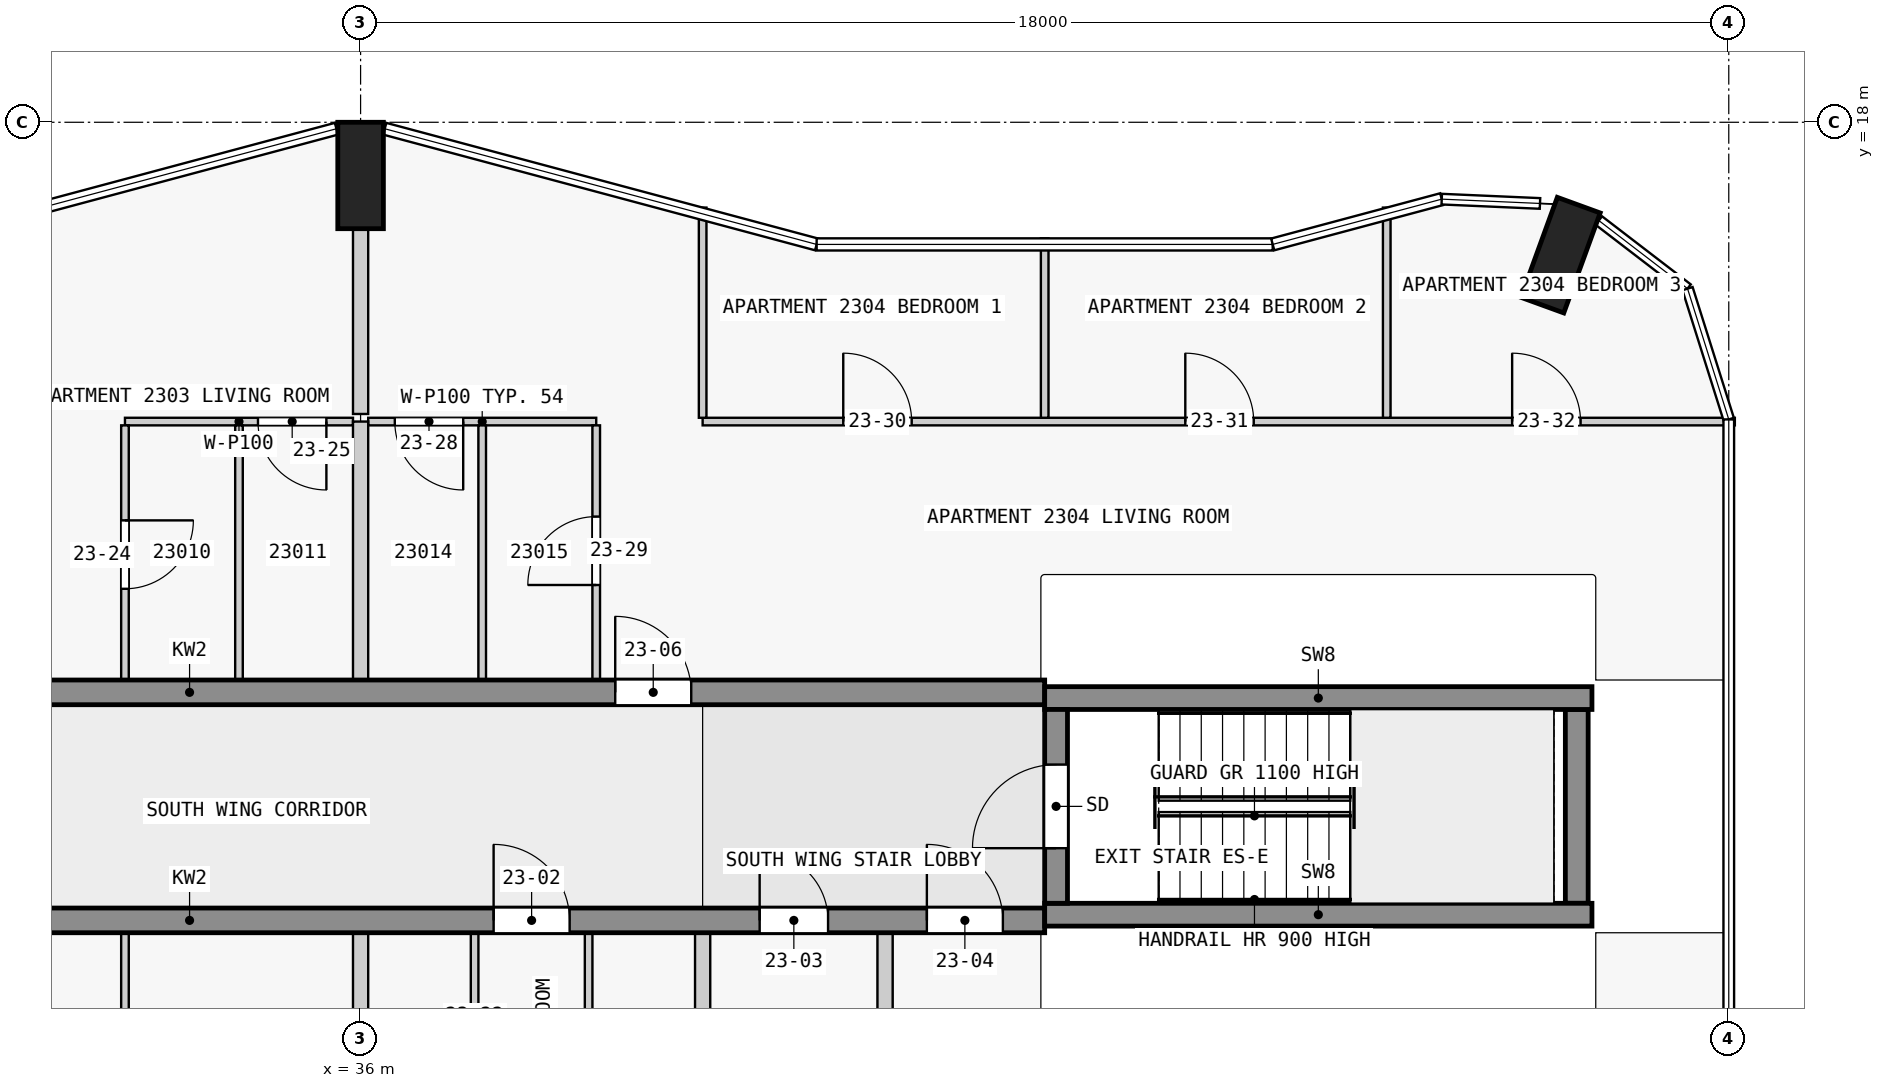
"""IFC4 building model, lengths in metres.
Left out: names, types, materials, properties, quantities, classifications, styles, units other than length and angle.
Written with IfcOpenShell. Run it as: python <this file> out.ifc"""

import sys

from ifc_helpers import new_model, si_unit, direction, frame, frame_2d, origin, origin_2d, place, context, subcontext, project, spatial, rectangle, extrude, element, fill, save


model = new_model("IFC4")
c1 = context("Model", 3, precision=1e-05, world=origin(), true_north=direction((0.0, 1.0)))
c2 = subcontext(c1, "Body", "Model", "MODEL_VIEW")
j1 = project(units=[si_unit("LENGTHUNIT", "METRE"), si_unit("PLANEANGLEUNIT", "RADIAN")], contexts=[c1])
p1 = place(None, origin())
s1 = spatial("IfcSite", under=j1, at=p1, CompositionType="ELEMENT")
p2 = place(p1, origin())
s2 = spatial("IfcBuilding", under=s1, at=p2, CompositionType="ELEMENT")
p3 = place(p2, frame((0.0, 0.0, 92.3)))
s3 = spatial("IfcBuildingStorey", under=s2, at=p3, CompositionType="ELEMENT", Elevation=92.3)
for number, where, z_axis, x_axis in (
    (1, (51.787, 16.252, 0.0), (0.0, 0.0, 1.0), (-0.94, 0.342, 0.0)),
    (2, (36.0, 17.3, 0.0), (0.0, 0.0, 1.0), (1.0, 0.0, 0.0)),
):
    element("IfcColumn", number, at=place(p3, frame(where, z_axis=z_axis, x_axis=x_axis)), inside=s3, PredefinedType="COLUMN", context=c2, shape_type="SweptSolid", body=[
        extrude(rectangle(XDim=0.6, YDim=1.4, at=origin_2d()), origin(), (0.0, 0.0, 1.0), 3.5),
    ])
p4 = place(p3, frame((45.15, 7.725, 0.0), z_axis=(0.0, 0.0, 1.0), x_axis=(0.0, 1.0, 0.0)))
e3 = element("IfcWall", 3, at=p4, inside=s3, PredefinedType="SHEAR", context=c2, shape_type="SweptSolid", body=[
    extrude(rectangle(XDim=2.55, YDim=0.3, at=frame_2d((1.275, 0.0))), origin(), (0.0, 0.0, 1.0), 3.5),
])
p5 = place(p4, frame((0.725, 0.0, 0.0)))
e4 = element("IfcOpeningElement", 4, at=p5, cuts=e3, PredefinedType="OPENING", context=c2, shape_type="SweptSolid", body=[
    extrude(rectangle(XDim=1.1, YDim=2.1, at=frame_2d((0.55, 1.05))), frame((0.0, 0.16, 0.0), z_axis=(0.0, -1.0, 0.0), x_axis=(1.0, 0.0, 0.0)), (0.0, 0.0, 1.0), 0.32),
])
p6 = place(p3, frame((52.0, 7.725, 0.0), z_axis=(0.0, 0.0, 1.0), x_axis=(0.0, 1.0, 0.0)))
e5 = element("IfcWall", 5, at=p6, inside=s3, PredefinedType="SHEAR", context=c2, shape_type="SweptSolid", body=[
    extrude(rectangle(XDim=2.55, YDim=0.3, at=frame_2d((1.275, 0.0))), origin(), (0.0, 0.0, 1.0), 3.5),
])
for number, where, z_axis, x_axis in (
    (6, (45.0, 7.575, 0.0), (0.0, 0.0, 1.0), (1.0, 0.0, 0.0)),
    (7, (45.0, 10.425, 0.0), (0.0, 0.0, 1.0), (1.0, 0.0, 0.0)),
):
    element("IfcWall", number, at=place(p3, frame(where, z_axis=z_axis, x_axis=x_axis)), inside=s3, PredefinedType="SHEAR", context=c2, shape_type="SweptSolid", body=[
        extrude(rectangle(XDim=7.2, YDim=0.3, at=frame_2d((3.6, 0.0))), origin(), (0.0, 0.0, 1.0), 3.5),
    ])
p7 = place(p3, frame((22.5, 7.5, 0.0), z_axis=(0.0, 0.0, 1.0), x_axis=(1.0, 0.0, 0.0)))
e8 = element("IfcWall", 8, at=p7, inside=s3, PredefinedType="SHEAR", context=c2, shape_type="SweptSolid", body=[
    extrude(rectangle(XDim=22.5, YDim=0.325, at=frame_2d((11.25, 0.0))), origin(), (0.0, 0.0, 1.0), 3.25),
])
p8 = place(p7, frame((5.65, 0.0, 0.0)))
e9 = element("IfcOpeningElement", 9, at=p8, cuts=e8, PredefinedType="OPENING", context=c2, shape_type="SweptSolid", body=[
    extrude(rectangle(XDim=1.0, YDim=2.1, at=frame_2d((0.5, 1.05))), frame((0.0, 0.172, 0.0), z_axis=(0.0, -1.0, 0.0), x_axis=(1.0, 0.0, 0.0)), (0.0, 0.0, 1.0), 0.345),
])
p9 = place(p7, frame((15.25, 0.0, 0.0)))
e10 = element("IfcOpeningElement", 10, at=p9, cuts=e8, PredefinedType="OPENING", context=c2, shape_type="SweptSolid", body=[
    extrude(rectangle(XDim=1.0, YDim=2.1, at=frame_2d((0.5, 1.05))), frame((0.0, 0.172, 0.0), z_axis=(0.0, -1.0, 0.0), x_axis=(1.0, 0.0, 0.0)), (0.0, 0.0, 1.0), 0.345),
])
p10 = place(p7, frame((18.75, 0.0, 0.0)))
e11 = element("IfcOpeningElement", 11, at=p10, cuts=e8, PredefinedType="OPENING", context=c2, shape_type="SweptSolid", body=[
    extrude(rectangle(XDim=0.9, YDim=2.1, at=frame_2d((0.45, 1.05))), frame((0.0, 0.172, 0.0), z_axis=(0.0, -1.0, 0.0), x_axis=(1.0, 0.0, 0.0)), (0.0, 0.0, 1.0), 0.345),
])
p11 = place(p7, frame((20.95, 0.0, 0.0)))
e12 = element("IfcOpeningElement", 12, at=p11, cuts=e8, PredefinedType="OPENING", context=c2, shape_type="SweptSolid", body=[
    extrude(rectangle(XDim=1.0, YDim=2.1, at=frame_2d((0.5, 1.05))), frame((0.0, 0.172, 0.0), z_axis=(0.0, -1.0, 0.0), x_axis=(1.0, 0.0, 0.0)), (0.0, 0.0, 1.0), 0.345),
])
p12 = place(p3, frame((22.5, 10.5, 0.0), z_axis=(0.0, 0.0, 1.0), x_axis=(1.0, 0.0, 0.0)))
e13 = element("IfcWall", 13, at=p12, inside=s3, PredefinedType="SHEAR", context=c2, shape_type="SweptSolid", body=[
    extrude(rectangle(XDim=22.5, YDim=0.325, at=frame_2d((11.25, 0.0))), origin(), (0.0, 0.0, 1.0), 3.25),
])
p13 = place(p12, frame((4.75, 0.0, 0.0)))
e14 = element("IfcOpeningElement", 14, at=p13, cuts=e13, PredefinedType="OPENING", context=c2, shape_type="SweptSolid", body=[
    extrude(rectangle(XDim=1.0, YDim=2.1, at=frame_2d((0.5, 1.05))), frame((0.0, 0.172, 0.0), z_axis=(0.0, -1.0, 0.0), x_axis=(1.0, 0.0, 0.0)), (0.0, 0.0, 1.0), 0.345),
])
p14 = place(p12, frame((16.85, 0.0, 0.0)))
e15 = element("IfcOpeningElement", 15, at=p14, cuts=e13, PredefinedType="OPENING", context=c2, shape_type="SweptSolid", body=[
    extrude(rectangle(XDim=1.0, YDim=2.1, at=frame_2d((0.5, 1.05))), frame((0.0, 0.172, 0.0), z_axis=(0.0, -1.0, 0.0), x_axis=(1.0, 0.0, 0.0)), (0.0, 0.0, 1.0), 0.345),
])
p15 = place(p3, frame((35.9, 14.062, 0.0), z_axis=(0.0, 0.0, 1.0), x_axis=(-1.0, 0.0, 0.0)))
e16 = element("IfcWall", 16, at=p15, inside=s3, PredefinedType="PARTITIONING", context=c2, shape_type="SweptSolid", body=[
    extrude(rectangle(XDim=3.0, YDim=0.1, at=frame_2d((1.5, 0.0))), origin(), (0.0, 0.0, 1.0), 3.25),
])
p16 = place(p15, frame((0.35, 0.0, 0.0)))
e17 = element("IfcOpeningElement", 17, at=p16, cuts=e16, PredefinedType="OPENING", context=c2, shape_type="SweptSolid", body=[
    extrude(rectangle(XDim=0.9, YDim=2.1, at=frame_2d((0.45, 1.05))), frame((0.0, 0.06, 0.0), z_axis=(0.0, -1.0, 0.0), x_axis=(1.0, 0.0, 0.0)), (0.0, 0.0, 1.0), 0.12),
])
p17 = place(p3, frame((39.1, 14.062, 0.0), z_axis=(0.0, 0.0, 1.0), x_axis=(-1.0, 0.0, 0.0)))
e18 = element("IfcWall", 18, at=p17, inside=s3, PredefinedType="PARTITIONING", context=c2, shape_type="SweptSolid", body=[
    extrude(rectangle(XDim=3.0, YDim=0.1, at=frame_2d((1.5, 0.0))), origin(), (0.0, 0.0, 1.0), 3.25),
])
p18 = place(p17, frame((1.75, 0.0, 0.0)))
e19 = element("IfcOpeningElement", 19, at=p18, cuts=e18, PredefinedType="OPENING", context=c2, shape_type="SweptSolid", body=[
    extrude(rectangle(XDim=0.9, YDim=2.1, at=frame_2d((0.45, 1.05))), frame((0.0, 0.06, 0.0), z_axis=(0.0, -1.0, 0.0), x_axis=(1.0, 0.0, 0.0)), (0.0, 0.0, 1.0), 0.12),
])
p19 = place(p3, frame((40.5, 14.062, 0.0), z_axis=(0.0, 0.0, 1.0), x_axis=(1.0, 0.0, 0.0)))
e20 = element("IfcWall", 20, at=p19, inside=s3, PredefinedType="PARTITIONING", context=c2, shape_type="SweptSolid", body=[
    extrude(rectangle(XDim=13.58, YDim=0.1, at=frame_2d((6.79, 0.0))), origin(), (0.0, 0.0, 1.0), 3.25),
])
p20 = place(p19, frame((1.85, 0.0, 0.0)))
e21 = element("IfcOpeningElement", 21, at=p20, cuts=e20, PredefinedType="OPENING", context=c2, shape_type="SweptSolid", body=[
    extrude(rectangle(XDim=0.9, YDim=2.1, at=frame_2d((0.45, 1.05))), frame((0.0, 0.06, 0.0), z_axis=(0.0, -1.0, 0.0), x_axis=(1.0, 0.0, 0.0)), (0.0, 0.0, 1.0), 0.12),
])
p21 = place(p19, frame((6.35, 0.0, 0.0)))
e22 = element("IfcOpeningElement", 22, at=p21, cuts=e20, PredefinedType="OPENING", context=c2, shape_type="SweptSolid", body=[
    extrude(rectangle(XDim=0.9, YDim=2.1, at=frame_2d((0.45, 1.05))), frame((0.0, 0.06, 0.0), z_axis=(0.0, -1.0, 0.0), x_axis=(1.0, 0.0, 0.0)), (0.0, 0.0, 1.0), 0.12),
])
p22 = place(p19, frame((10.65, 0.0, 0.0)))
e23 = element("IfcOpeningElement", 23, at=p22, cuts=e20, PredefinedType="OPENING", context=c2, shape_type="SweptSolid", body=[
    extrude(rectangle(XDim=0.9, YDim=2.1, at=frame_2d((0.45, 1.05))), frame((0.0, 0.06, 0.0), z_axis=(0.0, -1.0, 0.0), x_axis=(1.0, 0.0, 0.0)), (0.0, 0.0, 1.0), 0.12),
])
p23 = place(p3, frame((32.9, 7.337, 0.0), z_axis=(0.0, 0.0, 1.0), x_axis=(0.0, -1.0, 0.0)))
e24 = element("IfcWall", 24, at=p23, inside=s3, PredefinedType="PARTITIONING", context=c2, shape_type="SweptSolid", body=[
    extrude(rectangle(XDim=3.35, YDim=0.1, at=frame_2d((1.675, 0.0))), origin(), (0.0, 0.0, 1.0), 3.25),
])
p24 = place(p23, frame((1.25, 0.0, 0.0)))
e25 = element("IfcOpeningElement", 25, at=p24, cuts=e24, PredefinedType="OPENING", context=c2, shape_type="SweptSolid", body=[
    extrude(rectangle(XDim=0.9, YDim=2.1, at=frame_2d((0.45, 1.05))), frame((0.0, 0.06, 0.0), z_axis=(0.0, -1.0, 0.0), x_axis=(1.0, 0.0, 0.0)), (0.0, 0.0, 1.0), 0.12),
])
p25 = place(p3, frame((32.9, 14.012, 0.0), z_axis=(0.0, 0.0, 1.0), x_axis=(0.0, -1.0, 0.0)))
e26 = element("IfcWall", 26, at=p25, inside=s3, PredefinedType="PARTITIONING", context=c2, shape_type="SweptSolid", body=[
    extrude(rectangle(XDim=3.35, YDim=0.1, at=frame_2d((1.675, 0.0))), origin(), (0.0, 0.0, 1.0), 3.25),
])
p26 = place(p25, frame((1.25, 0.0, 0.0)))
e27 = element("IfcOpeningElement", 27, at=p26, cuts=e26, PredefinedType="OPENING", context=c2, shape_type="SweptSolid", body=[
    extrude(rectangle(XDim=0.9, YDim=2.1, at=frame_2d((0.45, 1.05))), frame((0.0, 0.06, 0.0), z_axis=(0.0, -1.0, 0.0), x_axis=(1.0, 0.0, 0.0)), (0.0, 0.0, 1.0), 0.12),
])
p27 = place(p3, frame((34.4, 10.663, 0.0), z_axis=(0.0, 0.0, 1.0), x_axis=(0.0, 1.0, 0.0)))
e28 = element("IfcWall", 28, at=p27, inside=s3, PredefinedType="PARTITIONING", context=c2, shape_type="SweptSolid", body=[
    extrude(rectangle(XDim=3.35, YDim=0.1, at=frame_2d((1.675, 0.0))), origin(), (0.0, 0.0, 1.0), 3.25),
])
p28 = place(p3, frame((36.0, 16.6, 0.0), z_axis=(0.0, 0.0, 1.0), x_axis=(0.0, -1.0, 0.0)))
e29 = element("IfcWall", 29, at=p28, inside=s3, PredefinedType="PARTITIONING", context=c2, shape_type="SweptSolid", body=[
    extrude(rectangle(XDim=2.438, YDim=0.2, at=frame_2d((1.219, 0.0))), origin(), (0.0, 0.0, 1.0), 3.25),
])
p29 = place(p3, frame((36.0, 1.4, 0.0), z_axis=(0.0, 0.0, 1.0), x_axis=(0.0, 1.0, 0.0)))
e30 = element("IfcWall", 30, at=p29, inside=s3, PredefinedType="PARTITIONING", context=c2, shape_type="SweptSolid", body=[
    extrude(rectangle(XDim=5.938, YDim=0.2, at=frame_2d((2.969, 0.0))), origin(), (0.0, 0.0, 1.0), 3.25),
])
p30 = place(p3, frame((36.0, 10.663, 0.0), z_axis=(0.0, 0.0, 1.0), x_axis=(0.0, 1.0, 0.0)))
e31 = element("IfcWall", 31, at=p30, inside=s3, PredefinedType="PARTITIONING", context=c2, shape_type="SweptSolid", body=[
    extrude(rectangle(XDim=3.4, YDim=0.2, at=frame_2d((1.7, 0.0))), origin(), (0.0, 0.0, 1.0), 3.25),
])
p31 = place(p3, frame((37.5, 3.988, 0.0), z_axis=(0.0, 0.0, 1.0), x_axis=(0.0, 1.0, 0.0)))
e32 = element("IfcWall", 32, at=p31, inside=s3, PredefinedType="PARTITIONING", context=c2, shape_type="SweptSolid", body=[
    extrude(rectangle(XDim=3.35, YDim=0.1, at=frame_2d((1.675, 0.0))), origin(), (0.0, 0.0, 1.0), 3.25),
])
p32 = place(p31, frame((1.25, 0.0, 0.0)))
e33 = element("IfcOpeningElement", 33, at=p32, cuts=e32, PredefinedType="OPENING", context=c2, shape_type="SweptSolid", body=[
    extrude(rectangle(XDim=0.9, YDim=2.1, at=frame_2d((0.45, 1.05))), frame((0.0, 0.06, 0.0), z_axis=(0.0, -1.0, 0.0), x_axis=(1.0, 0.0, 0.0)), (0.0, 0.0, 1.0), 0.12),
])
p33 = place(p3, frame((37.6, 10.663, 0.0), z_axis=(0.0, 0.0, 1.0), x_axis=(0.0, 1.0, 0.0)))
e34 = element("IfcWall", 34, at=p33, inside=s3, PredefinedType="PARTITIONING", context=c2, shape_type="SweptSolid", body=[
    extrude(rectangle(XDim=3.35, YDim=0.1, at=frame_2d((1.675, 0.0))), origin(), (0.0, 0.0, 1.0), 3.25),
])
p34 = place(p3, frame((39.0, 7.337, 0.0), z_axis=(0.0, 0.0, 1.0), x_axis=(0.0, -1.0, 0.0)))
e35 = element("IfcWall", 35, at=p34, inside=s3, PredefinedType="PARTITIONING", context=c2, shape_type="SweptSolid", body=[
    extrude(rectangle(XDim=3.4, YDim=0.1, at=frame_2d((1.7, 0.0))), origin(), (0.0, 0.0, 1.0), 3.25),
])
p35 = place(p34, frame((1.25, 0.0, 0.0)))
e36 = element("IfcOpeningElement", 36, at=p35, cuts=e35, PredefinedType="OPENING", context=c2, shape_type="SweptSolid", body=[
    extrude(rectangle(XDim=0.9, YDim=2.1, at=frame_2d((0.45, 1.05))), frame((0.0, 0.06, 0.0), z_axis=(0.0, -1.0, 0.0), x_axis=(1.0, 0.0, 0.0)), (0.0, 0.0, 1.0), 0.12),
])
p36 = place(p3, frame((39.1, 10.663, 0.0), z_axis=(0.0, 0.0, 1.0), x_axis=(0.0, 1.0, 0.0)))
e37 = element("IfcWall", 37, at=p36, inside=s3, PredefinedType="PARTITIONING", context=c2, shape_type="SweptSolid", body=[
    extrude(rectangle(XDim=3.35, YDim=0.1, at=frame_2d((1.675, 0.0))), origin(), (0.0, 0.0, 1.0), 3.25),
])
p37 = place(p36, frame((1.25, 0.0, 0.0)))
e38 = element("IfcOpeningElement", 38, at=p37, cuts=e37, PredefinedType="OPENING", context=c2, shape_type="SweptSolid", body=[
    extrude(rectangle(XDim=0.9, YDim=2.1, at=frame_2d((0.45, 1.05))), frame((0.0, 0.06, 0.0), z_axis=(0.0, -1.0, 0.0), x_axis=(1.0, 0.0, 0.0)), (0.0, 0.0, 1.0), 0.12),
])
p38 = place(p3, frame((40.5, 16.878, 0.0), z_axis=(0.0, 0.0, 1.0), x_axis=(0.0, -1.0, 0.0)))
e39 = element("IfcWall", 39, at=p38, inside=s3, PredefinedType="PARTITIONING", context=c2, shape_type="SweptSolid", body=[
    extrude(rectangle(XDim=2.765, YDim=0.1, at=frame_2d((1.383, 0.0))), origin(), (0.0, 0.0, 1.0), 3.25),
])
for number, where, z_axis, x_axis in (
    (40, (40.5, 3.938, 0.0), (0.0, 0.0, 1.0), (0.0, 1.0, 0.0)),
    (41, (42.9, 3.938, 0.0), (0.0, 0.0, 1.0), (0.0, 1.0, 0.0)),
):
    element("IfcWall", number, at=place(p3, frame(where, z_axis=z_axis, x_axis=x_axis)), inside=s3, PredefinedType="PARTITIONING", context=c2, shape_type="SweptSolid", body=[
        extrude(rectangle(XDim=3.4, YDim=0.2, at=frame_2d((1.7, 0.0))), origin(), (0.0, 0.0, 1.0), 3.25),
    ])
p39 = place(p3, frame((45.0, 14.113, 0.0), z_axis=(0.0, 0.0, 1.0), x_axis=(0.0, 1.0, 0.0)))
e42 = element("IfcWall", 42, at=p39, inside=s3, PredefinedType="PARTITIONING", context=c2, shape_type="SweptSolid", body=[
    extrude(rectangle(XDim=2.361, YDim=0.1, at=frame_2d((1.18, 0.0))), origin(), (0.0, 0.0, 1.0), 3.25),
])
p40 = place(p3, frame((49.5, 14.113, 0.0), z_axis=(0.0, 0.0, 1.0), x_axis=(0.0, 1.0, 0.0)))
e43 = element("IfcWall", 43, at=p40, inside=s3, PredefinedType="PARTITIONING", context=c2, shape_type="SweptSolid", body=[
    extrude(rectangle(XDim=2.765, YDim=0.1, at=frame_2d((1.383, 0.0))), origin(), (0.0, 0.0, 1.0), 3.25),
])
p41 = place(p5, origin())
e44 = element("IfcDoor", 44, at=p41, inside=s3, OperationType="SINGLE_SWING_LEFT", PredefinedType="DOOR", context=c2, shape_type="SweptSolid", body=[
    extrude(rectangle(XDim=1.1, YDim=2.1, at=frame_2d((0.55, 1.05))), frame((0.0, 0.025, 0.0), z_axis=(0.0, -1.0, 0.0), x_axis=(1.0, 0.0, 0.0)), (0.0, 0.0, 1.0), 0.05),
])
fill(e4, e44)
p42 = place(p9, origin())
e45 = element("IfcDoor", 45, at=p42, inside=s3, OperationType="SINGLE_SWING_RIGHT", PredefinedType="DOOR", context=c2, shape_type="SweptSolid", body=[
    extrude(rectangle(XDim=1.0, YDim=2.1, at=frame_2d((0.5, 1.05))), frame((0.0, 0.025, 0.0), z_axis=(0.0, -1.0, 0.0), x_axis=(1.0, 0.0, 0.0)), (0.0, 0.0, 1.0), 0.05),
])
fill(e10, e45)
p43 = place(p10, origin())
e46 = element("IfcDoor", 46, at=p43, inside=s3, OperationType="SINGLE_SWING_RIGHT", PredefinedType="DOOR", context=c2, shape_type="SweptSolid", body=[
    extrude(rectangle(XDim=0.9, YDim=2.1, at=frame_2d((0.45, 1.05))), frame((0.0, 0.025, 0.0), z_axis=(0.0, -1.0, 0.0), x_axis=(1.0, 0.0, 0.0)), (0.0, 0.0, 1.0), 0.05),
])
fill(e11, e46)
p44 = place(p11, origin())
e47 = element("IfcDoor", 47, at=p44, inside=s3, OperationType="SINGLE_SWING_RIGHT", PredefinedType="DOOR", context=c2, shape_type="SweptSolid", body=[
    extrude(rectangle(XDim=1.0, YDim=2.1, at=frame_2d((0.5, 1.05))), frame((0.0, 0.025, 0.0), z_axis=(0.0, -1.0, 0.0), x_axis=(1.0, 0.0, 0.0)), (0.0, 0.0, 1.0), 0.05),
])
fill(e12, e47)
p45 = place(p14, origin())
e48 = element("IfcDoor", 48, at=p45, inside=s3, OperationType="SINGLE_SWING_RIGHT", PredefinedType="DOOR", context=c2, shape_type="SweptSolid", body=[
    extrude(rectangle(XDim=1.0, YDim=2.1, at=frame_2d((0.5, 1.05))), frame((0.0, 0.025, 0.0), z_axis=(0.0, -1.0, 0.0), x_axis=(1.0, 0.0, 0.0)), (0.0, 0.0, 1.0), 0.05),
])
fill(e15, e48)
p46 = place(p26, origin())
e49 = element("IfcDoor", 49, at=p46, inside=s3, OperationType="SINGLE_SWING_RIGHT", PredefinedType="DOOR", context=c2, shape_type="SweptSolid", body=[
    extrude(rectangle(XDim=0.9, YDim=2.1, at=frame_2d((0.45, 1.05))), frame((0.0, 0.025, 0.0), z_axis=(0.0, -1.0, 0.0), x_axis=(1.0, 0.0, 0.0)), (0.0, 0.0, 1.0), 0.05),
])
fill(e27, e49)
p47 = place(p16, origin())
e50 = element("IfcDoor", 50, at=p47, inside=s3, OperationType="SINGLE_SWING_LEFT", PredefinedType="DOOR", context=c2, shape_type="SweptSolid", body=[
    extrude(rectangle(XDim=0.9, YDim=2.1, at=frame_2d((0.45, 1.05))), frame((0.0, 0.025, 0.0), z_axis=(0.0, -1.0, 0.0), x_axis=(1.0, 0.0, 0.0)), (0.0, 0.0, 1.0), 0.05),
])
fill(e17, e50)
p48 = place(p18, origin())
e51 = element("IfcDoor", 51, at=p48, inside=s3, OperationType="SINGLE_SWING_RIGHT", PredefinedType="DOOR", context=c2, shape_type="SweptSolid", body=[
    extrude(rectangle(XDim=0.9, YDim=2.1, at=frame_2d((0.45, 1.05))), frame((0.0, 0.025, 0.0), z_axis=(0.0, -1.0, 0.0), x_axis=(1.0, 0.0, 0.0)), (0.0, 0.0, 1.0), 0.05),
])
fill(e19, e51)
p49 = place(p37, origin())
e52 = element("IfcDoor", 52, at=p49, inside=s3, OperationType="SINGLE_SWING_RIGHT", PredefinedType="DOOR", context=c2, shape_type="SweptSolid", body=[
    extrude(rectangle(XDim=0.9, YDim=2.1, at=frame_2d((0.45, 1.05))), frame((0.0, 0.025, 0.0), z_axis=(0.0, -1.0, 0.0), x_axis=(1.0, 0.0, 0.0)), (0.0, 0.0, 1.0), 0.05),
])
fill(e38, e52)
p50 = place(p20, origin())
e53 = element("IfcDoor", 53, at=p50, inside=s3, OperationType="SINGLE_SWING_LEFT", PredefinedType="DOOR", context=c2, shape_type="SweptSolid", body=[
    extrude(rectangle(XDim=0.9, YDim=2.1, at=frame_2d((0.45, 1.05))), frame((0.0, 0.025, 0.0), z_axis=(0.0, -1.0, 0.0), x_axis=(1.0, 0.0, 0.0)), (0.0, 0.0, 1.0), 0.05),
])
fill(e21, e53)
p51 = place(p21, origin())
e54 = element("IfcDoor", 54, at=p51, inside=s3, OperationType="SINGLE_SWING_RIGHT", PredefinedType="DOOR", context=c2, shape_type="SweptSolid", body=[
    extrude(rectangle(XDim=0.9, YDim=2.1, at=frame_2d((0.45, 1.05))), frame((0.0, 0.025, 0.0), z_axis=(0.0, -1.0, 0.0), x_axis=(1.0, 0.0, 0.0)), (0.0, 0.0, 1.0), 0.05),
])
fill(e22, e54)
p52 = place(p22, origin())
e55 = element("IfcDoor", 55, at=p52, inside=s3, OperationType="SINGLE_SWING_RIGHT", PredefinedType="DOOR", context=c2, shape_type="SweptSolid", body=[
    extrude(rectangle(XDim=0.9, YDim=2.1, at=frame_2d((0.45, 1.05))), frame((0.0, 0.025, 0.0), z_axis=(0.0, -1.0, 0.0), x_axis=(1.0, 0.0, 0.0)), (0.0, 0.0, 1.0), 0.05),
])
fill(e23, e55)
save(model, sys.argv[1])
